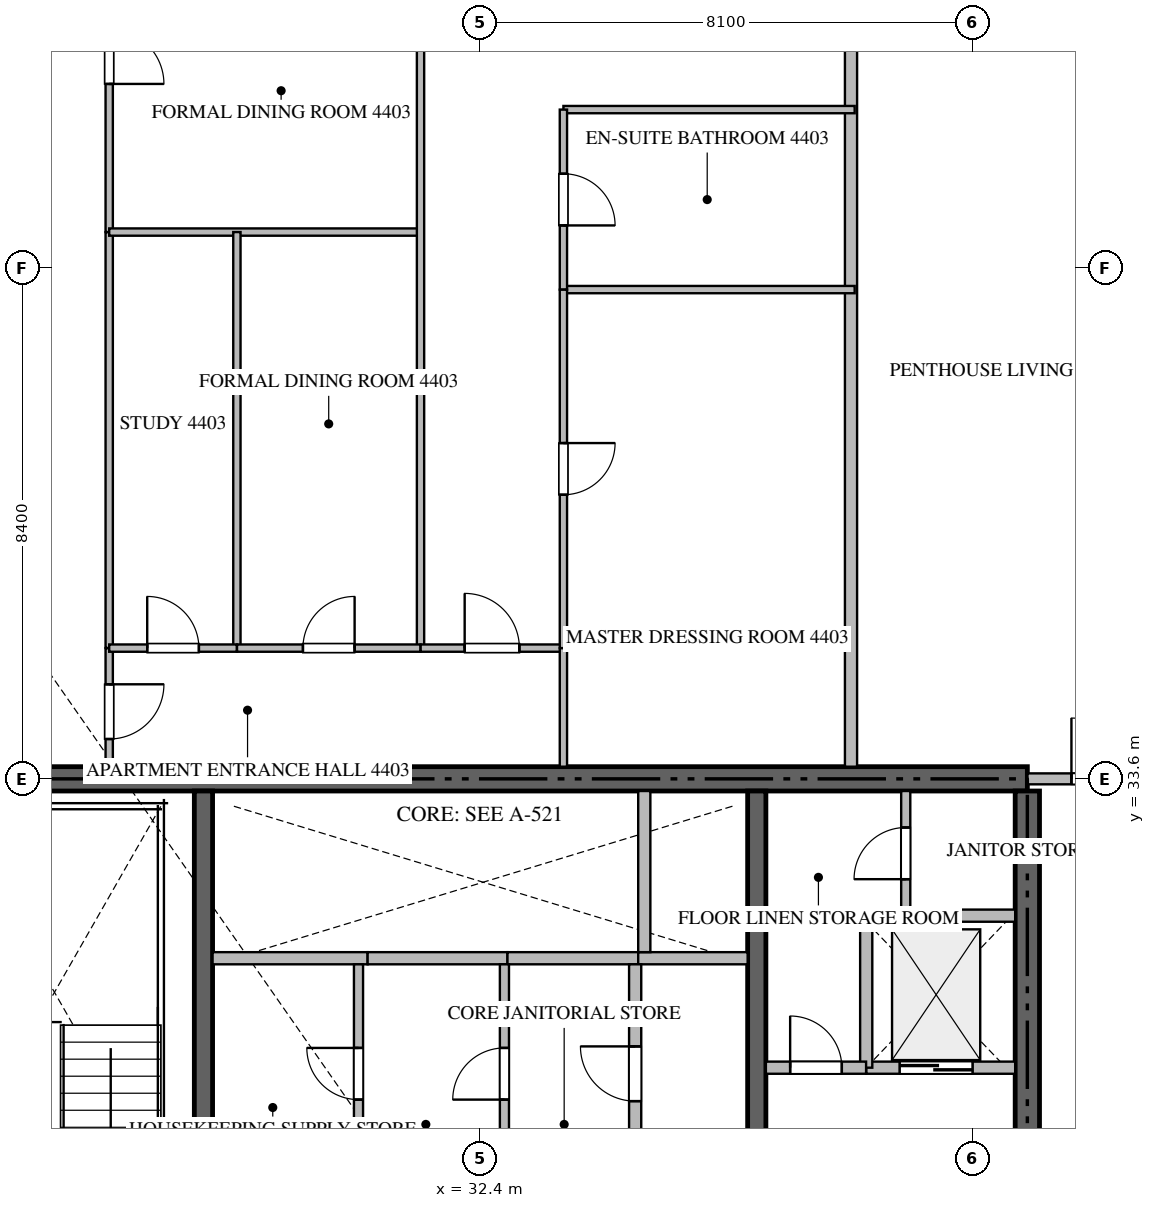
"""IFC4 building model, lengths in metres.
Left out: names, types, materials, properties, quantities, classifications, styles, units other than length and angle.
Written with IfcOpenShell. Run it as: python <this file> out.ifc"""

import sys

from ifc_helpers import new_model, si_unit, direction, frame, frame_2d, origin, place, context, subcontext, project, spatial, rectangle, extrude, source, transform, mapped, element, fill, save


model = new_model("IFC4")
c1 = context("Model", 3, precision=1e-05, world=origin(), true_north=direction((0.0, 1.0)))
c2 = subcontext(c1, "Body", "Model", "MODEL_VIEW")
j1 = project(units=[si_unit("LENGTHUNIT", "METRE"), si_unit("PLANEANGLEUNIT", "RADIAN")], contexts=[c1])
p1 = place(None, origin())
s1 = spatial("IfcSite", under=j1, at=p1, CompositionType="ELEMENT")
p2 = place(p1, origin())
s2 = spatial("IfcBuilding", under=s1, at=p2, CompositionType="ELEMENT")
p3 = place(p2, frame((0.0, 0.0, 176.4)))
s3 = spatial("IfcBuildingStorey", under=s2, at=p3, CompositionType="ELEMENT", Elevation=176.4)
p4 = place(p3, frame((41.4, 33.6, -0.26), z_axis=(0.0, 0.0, 1.0), x_axis=(-1.0, 0.0, 0.0)))
e1 = element("IfcWall", 1, at=p4, inside=s3, PredefinedType="SHEAR", context=c2, shape_type="SweptSolid", body=[
    extrude(rectangle(XDim=18.0, YDim=0.4, at=frame_2d((9.0, 0.0))), origin(), (0.0, 0.0, 1.0), 3.748),
])
p5 = place(p3, frame((41.4, 27.75, -0.26), z_axis=(0.0, 0.0, 1.0), x_axis=(0.0, 1.0, 0.0)))
e2 = element("IfcWall", 2, at=p5, inside=s3, PredefinedType="SHEAR", context=c2, shape_type="SweptSolid", body=[
    extrude(rectangle(XDim=5.65, YDim=0.4, at=frame_2d((2.825, 0.0))), origin(), (0.0, 0.0, 1.0), 3.748),
])
p6 = place(p3, frame((27.85, 23.55, -0.26), z_axis=(0.0, 0.0, 1.0), x_axis=(0.0, 1.0, 0.0)))
e3 = element("IfcWall", 3, at=p6, inside=s3, PredefinedType="SHEAR", context=c2, shape_type="SweptSolid", body=[
    extrude(rectangle(XDim=9.85, YDim=0.3, at=frame_2d((4.925, 0.0))), origin(), (0.0, 0.0, 1.0), 3.748),
])
p7 = place(p3, frame((36.95, 27.05, -0.26), z_axis=(0.0, 0.0, 1.0), x_axis=(0.0, 1.0, 0.0)))
e4 = element("IfcWall", 4, at=p7, inside=s3, PredefinedType="SHEAR", context=c2, shape_type="SweptSolid", body=[
    extrude(rectangle(XDim=6.35, YDim=0.3, at=frame_2d((3.175, 0.0))), origin(), (0.0, 0.0, 1.0), 3.748),
])
p8 = place(p3, frame((38.75, 28.85, 0.0), z_axis=(0.0, 0.0, 1.0), x_axis=(1.0, 0.0, 0.0)))
e5 = element("IfcWall", 5, at=p8, inside=s3, PredefinedType="STANDARD", context=c2, shape_type="SweptSolid", body=[
    extrude(rectangle(XDim=2.45, YDim=0.2, at=frame_2d((1.225, 0.0))), origin(), (0.0, 0.0, 1.0), 3.49),
])
p9 = place(p8, frame((0.55, 0.0, 0.0)))
e6 = element("IfcOpeningElement", 6, at=p9, cuts=e5, PredefinedType="OPENING", context=c2, shape_type="SweptSolid", body=[
    extrude(rectangle(XDim=1.2, YDim=2.2, at=frame_2d((0.6, 1.1))), frame((0.0, 0.11, 0.0), z_axis=(0.0, -1.0, 0.0), x_axis=(1.0, 0.0, 0.0)), (0.0, 0.0, 1.0), 0.22),
])
p10 = place(p3, frame((28.0, 30.65, 0.0), z_axis=(0.0, 0.0, 1.0), x_axis=(1.0, 0.0, 0.0)))
e7 = element("IfcWall", 7, at=p10, inside=s3, PredefinedType="STANDARD", context=c2, shape_type="SweptSolid", body=[
    extrude(rectangle(XDim=2.55, YDim=0.2, at=frame_2d((1.275, 0.0))), origin(), (0.0, 0.0, 1.0), 3.49),
])
p11 = place(p3, frame((30.55, 30.65, 0.0), z_axis=(0.0, 0.0, 1.0), x_axis=(1.0, 0.0, 0.0)))
e8 = element("IfcWall", 8, at=p11, inside=s3, PredefinedType="STANDARD", context=c2, shape_type="SweptSolid", body=[
    extrude(rectangle(XDim=2.3, YDim=0.2, at=frame_2d((1.15, 0.0))), origin(), (0.0, 0.0, 1.0), 3.49),
])
p12 = place(p3, frame((32.85, 30.65, 0.0), z_axis=(0.0, 0.0, 1.0), x_axis=(1.0, 0.0, 0.0)))
e9 = element("IfcWall", 9, at=p12, inside=s3, PredefinedType="STANDARD", context=c2, shape_type="SweptSolid", body=[
    extrude(rectangle(XDim=2.15, YDim=0.2, at=frame_2d((1.075, 0.0))), origin(), (0.0, 0.0, 1.0), 3.49),
])
p13 = place(p3, frame((35.0, 30.65, 0.0), z_axis=(0.0, 0.0, 1.0), x_axis=(1.0, 0.0, 0.0)))
e10 = element("IfcWall", 10, at=p13, inside=s3, PredefinedType="STANDARD", context=c2, shape_type="SweptSolid", body=[
    extrude(rectangle(XDim=1.8, YDim=0.2, at=frame_2d((0.9, 0.0))), origin(), (0.0, 0.0, 1.0), 3.49),
])
p14 = place(p3, frame((35.1, 30.75, 0.0), z_axis=(0.0, 0.0, 1.0), x_axis=(0.0, 1.0, 0.0)))
e11 = element("IfcWall", 11, at=p14, inside=s3, PredefinedType="STANDARD", context=c2, shape_type="SweptSolid", body=[
    extrude(rectangle(XDim=2.65, YDim=0.2, at=frame_2d((1.325, 0.0))), origin(), (0.0, 0.0, 1.0), 3.49),
])
p15 = place(p3, frame((38.75, 28.85, 0.0), z_axis=(0.0, 0.0, 1.0), x_axis=(0.0, 1.0, 0.0)))
e12 = element("IfcWall", 12, at=p15, inside=s3, PredefinedType="STANDARD", context=c2, shape_type="SweptSolid", body=[
    extrude(rectangle(XDim=2.5, YDim=0.2, at=frame_2d((1.25, 0.0))), origin(), (0.0, 0.0, 1.0), 3.49),
])
p16 = place(p3, frame((38.75, 31.35, 0.0), z_axis=(0.0, 0.0, 1.0), x_axis=(1.0, 0.0, 0.0)))
e13 = element("IfcWall", 13, at=p16, inside=s3, PredefinedType="STANDARD", context=c2, shape_type="SweptSolid", body=[
    extrude(rectangle(XDim=2.45, YDim=0.2, at=frame_2d((1.225, 0.0))), origin(), (0.0, 0.0, 1.0), 3.49),
])
p17 = place(p3, frame((37.1, 28.85, 0.0), z_axis=(0.0, 0.0, 1.0), x_axis=(1.0, 0.0, 0.0)))
e14 = element("IfcWall", 14, at=p17, inside=s3, PredefinedType="STANDARD", context=c2, shape_type="SweptSolid", body=[
    extrude(rectangle(XDim=1.648, YDim=0.2, at=frame_2d((0.824, 0.0))), origin(), (0.0, 0.0, 1.0), 3.49),
])
p18 = place(p17, frame((0.399, 0.0, 0.0)))
e15 = element("IfcOpeningElement", 15, at=p18, cuts=e14, PredefinedType="OPENING", context=c2, shape_type="SweptSolid", body=[
    extrude(rectangle(XDim=0.85, YDim=2.1, at=frame_2d((0.425, 1.05))), frame((0.0, 0.11, 0.0), z_axis=(0.0, -1.0, 0.0), x_axis=(1.0, 0.0, 0.0)), (0.0, 0.0, 1.0), 0.22),
])
p19 = place(p3, frame((39.4, 31.35, 0.0), z_axis=(0.0, 0.0, 1.0), x_axis=(0.0, 1.0, 0.0)))
e16 = element("IfcWall", 16, at=p19, inside=s3, PredefinedType="PARTITIONING", context=c2, shape_type="SweptSolid", body=[
    extrude(rectangle(XDim=2.05, YDim=0.15, at=frame_2d((1.025, 0.0))), origin(), (0.0, 0.0, 1.0), 3.49),
])
p20 = place(p19, frame((0.6, 0.0, 0.0)))
e17 = element("IfcOpeningElement", 17, at=p20, cuts=e16, PredefinedType="OPENING", context=c2, shape_type="SweptSolid", body=[
    extrude(rectangle(XDim=0.85, YDim=2.1, at=frame_2d((0.425, 1.05))), frame((0.0, 0.085, 0.0), z_axis=(0.0, -1.0, 0.0), x_axis=(1.0, 0.0, 0.0)), (0.0, 0.0, 1.0), 0.17),
])
p21 = place(p3, frame((34.95, 26.95, 0.0), z_axis=(0.0, 0.0, 1.0), x_axis=(0.0, 1.0, 0.0)))
e18 = element("IfcWall", 18, at=p21, inside=s3, PredefinedType="STANDARD", context=c2, shape_type="SweptSolid", body=[
    extrude(rectangle(XDim=3.6, YDim=0.2, at=frame_2d((1.8, 0.0))), origin(), (0.0, 0.0, 1.0), 3.49),
])
p22 = place(p21, frame((1.35, 0.0, 0.0)))
e19 = element("IfcOpeningElement", 19, at=p22, cuts=e18, PredefinedType="OPENING", context=c2, shape_type="SweptSolid", body=[
    extrude(rectangle(XDim=0.9, YDim=2.1, at=frame_2d((0.45, 1.05))), frame((0.0, 0.11, 0.0), z_axis=(0.0, -1.0, 0.0), x_axis=(1.0, 0.0, 0.0)), (0.0, 0.0, 1.0), 0.22),
])
p23 = place(p3, frame((32.8, 26.95, 0.0), z_axis=(0.0, 0.0, 1.0), x_axis=(0.0, 1.0, 0.0)))
e20 = element("IfcWall", 20, at=p23, inside=s3, PredefinedType="PARTITIONING", context=c2, shape_type="SweptSolid", body=[
    extrude(rectangle(XDim=3.6, YDim=0.15, at=frame_2d((1.8, 0.0))), origin(), (0.0, 0.0, 1.0), 3.49),
])
p24 = place(p23, frame((1.375, 0.0, 0.0)))
e21 = element("IfcOpeningElement", 21, at=p24, cuts=e20, PredefinedType="OPENING", context=c2, shape_type="SweptSolid", body=[
    extrude(rectangle(XDim=0.85, YDim=2.1, at=frame_2d((0.425, 1.05))), frame((0.0, 0.085, 0.0), z_axis=(0.0, -1.0, 0.0), x_axis=(1.0, 0.0, 0.0)), (0.0, 0.0, 1.0), 0.17),
])
p25 = place(p3, frame((30.4, 26.95, 0.0), z_axis=(0.0, 0.0, 1.0), x_axis=(0.0, 1.0, 0.0)))
e22 = element("IfcWall", 22, at=p25, inside=s3, PredefinedType="PARTITIONING", context=c2, shape_type="SweptSolid", body=[
    extrude(rectangle(XDim=3.6, YDim=0.15, at=frame_2d((1.8, 0.0))), origin(), (0.0, 0.0, 1.0), 3.49),
])
p26 = place(p25, frame((1.375, 0.0, 0.0)))
e23 = element("IfcOpeningElement", 23, at=p26, cuts=e22, PredefinedType="OPENING", context=c2, shape_type="SweptSolid", body=[
    extrude(rectangle(XDim=0.85, YDim=2.1, at=frame_2d((0.425, 1.05))), frame((0.0, 0.085, 0.0), z_axis=(0.0, -1.0, 0.0), x_axis=(1.0, 0.0, 0.0)), (0.0, 0.0, 1.0), 0.17),
])
p27 = place(p3, frame((38.5, 33.8, 0.0), z_axis=(0.0, 0.0, 1.0), x_axis=(0.0, 1.0, 0.0)))
e24 = element("IfcWall", 24, at=p27, inside=s3, PredefinedType="PARTITIONING", context=c2, shape_type="SweptSolid", body=[
    extrude(rectangle(XDim=15.118, YDim=0.2, at=frame_2d((7.559, 0.0))), origin(), (0.0, 0.0, 1.0), 3.49),
])
p28 = place(p3, frame((41.402, 33.6, 0.0), z_axis=(0.0, 0.0, 1.0), x_axis=(1.0, 0.0, 0.0)))
e25 = element("IfcWall", 25, at=p28, inside=s3, PredefinedType="PARTITIONING", context=c2, shape_type="SweptSolid", body=[
    extrude(rectangle(XDim=2.446, YDim=0.18, at=frame_2d((1.223, 0.0))), origin(), (0.0, 0.0, 1.0), 3.49),
])
p29 = place(p28, frame((0.723, 0.0, 0.0)))
e26 = element("IfcOpeningElement", 26, at=p29, cuts=e25, PredefinedType="OPENING", context=c2, shape_type="SweptSolid", body=[
    extrude(rectangle(XDim=1.0, YDim=2.15, at=frame_2d((0.5, 1.075))), frame((0.0, 0.1, 0.0), z_axis=(0.0, -1.0, 0.0), x_axis=(1.0, 0.0, 0.0)), (0.0, 0.0, 1.0), 0.2),
])
p30 = place(p3, frame((26.3, 35.75, 0.0), z_axis=(0.0, 0.0, 1.0), x_axis=(0.0, -1.0, 0.0)))
e27 = element("IfcWall", 27, at=p30, inside=s3, PredefinedType="PARTITIONING", context=c2, shape_type="SweptSolid", body=[
    extrude(rectangle(XDim=1.95, YDim=0.12, at=frame_2d((0.975, 0.0))), origin(), (0.0, 0.0, 1.0), 3.49),
])
p31 = place(p30, frame((0.595, 0.0, 0.0)))
e28 = element("IfcOpeningElement", 28, at=p31, cuts=e27, PredefinedType="OPENING", context=c2, shape_type="SweptSolid", body=[
    extrude(rectangle(XDim=0.9, YDim=2.1, at=frame_2d((0.45, 1.05))), frame((0.0, 0.07, 0.0), z_axis=(0.0, -1.0, 0.0), x_axis=(1.0, 0.0, 0.0)), (0.0, 0.0, 1.0), 0.14),
])
p32 = place(p3, frame((26.3, 48.905, 0.0), z_axis=(0.0, 0.0, 1.0), x_axis=(0.0, -1.0, 0.0)))
e29 = element("IfcWall", 29, at=p32, inside=s3, PredefinedType="PARTITIONING", context=c2, shape_type="SweptSolid", body=[
    extrude(rectangle(XDim=6.313, YDim=0.12, at=frame_2d((3.156, 0.0))), origin(), (0.0, 0.0, 1.0), 3.49),
])
p33 = place(p32, frame((2.977, 0.0, 0.0)))
e30 = element("IfcOpeningElement", 30, at=p33, cuts=e29, PredefinedType="OPENING", context=c2, shape_type="SweptSolid", body=[
    extrude(rectangle(XDim=0.9, YDim=2.1, at=frame_2d((0.45, 1.05))), frame((0.0, 0.07, 0.0), z_axis=(0.0, -1.0, 0.0), x_axis=(1.0, 0.0, 0.0)), (0.0, 0.0, 1.0), 0.14),
])
p34 = place(p3, frame((26.3, 42.59, 0.0), z_axis=(0.0, 0.0, 1.0), x_axis=(0.0, -1.0, 0.0)))
e31 = element("IfcWall", 31, at=p34, inside=s3, PredefinedType="PARTITIONING", context=c2, shape_type="SweptSolid", body=[
    extrude(rectangle(XDim=6.838, YDim=0.12, at=frame_2d((3.419, 0.0))), origin(), (0.0, 0.0, 1.0), 3.49),
])
p35 = place(p3, frame((26.3, 42.592, 0.0), z_axis=(0.0, 0.0, 1.0), x_axis=(1.0, 0.0, 0.0)))
e32 = element("IfcWall", 32, at=p35, inside=s3, PredefinedType="PARTITIONING", context=c2, shape_type="SweptSolid", body=[
    extrude(rectangle(XDim=5.12, YDim=0.12, at=frame_2d((2.56, 0.0))), origin(), (0.0, 0.0, 1.0), 3.49),
])
p36 = place(p3, frame((31.42, 48.905, 0.0), z_axis=(0.0, 0.0, 1.0), x_axis=(0.0, -1.0, 0.0)))
e33 = element("IfcWall", 33, at=p36, inside=s3, PredefinedType="PARTITIONING", context=c2, shape_type="SweptSolid", body=[
    extrude(rectangle(XDim=13.155, YDim=0.12, at=frame_2d((6.578, 0.0))), origin(), (0.0, 0.0, 1.0), 3.49),
])
p37 = place(p3, frame((28.4, 42.592, 0.0), z_axis=(0.0, 0.0, 1.0), x_axis=(0.0, -1.0, 0.0)))
e34 = element("IfcWall", 34, at=p37, inside=s3, PredefinedType="PARTITIONING", context=c2, shape_type="SweptSolid", body=[
    extrude(rectangle(XDim=6.842, YDim=0.12, at=frame_2d((3.421, 0.0))), origin(), (0.0, 0.0, 1.0), 3.49),
])
p38 = place(p3, frame((26.3, 35.75, 0.0), z_axis=(0.0, 0.0, 1.0), x_axis=(1.0, 0.0, 0.0)))
e35 = element("IfcWall", 35, at=p38, inside=s3, PredefinedType="PARTITIONING", context=c2, shape_type="SweptSolid", body=[
    extrude(rectangle(XDim=2.1, YDim=0.12, at=frame_2d((1.05, 0.0))), origin(), (0.0, 0.0, 1.0), 3.49),
])
p39 = place(p38, frame((0.625, 0.0, 0.0)))
e36 = element("IfcOpeningElement", 36, at=p39, cuts=e35, PredefinedType="OPENING", context=c2, shape_type="SweptSolid", body=[
    extrude(rectangle(XDim=0.85, YDim=2.1, at=frame_2d((0.425, 1.05))), frame((0.0, 0.07, 0.0), z_axis=(0.0, -1.0, 0.0), x_axis=(1.0, 0.0, 0.0)), (0.0, 0.0, 1.0), 0.14),
])
p40 = place(p3, frame((28.402, 35.75, 0.0), z_axis=(0.0, 0.0, 1.0), x_axis=(1.0, 0.0, 0.0)))
e37 = element("IfcWall", 37, at=p40, inside=s3, PredefinedType="PARTITIONING", context=c2, shape_type="SweptSolid", body=[
    extrude(rectangle(XDim=3.018, YDim=0.12, at=frame_2d((1.509, 0.0))), origin(), (0.0, 0.0, 1.0), 3.49),
])
p41 = place(p40, frame((1.084, 0.0, 0.0)))
e38 = element("IfcOpeningElement", 38, at=p41, cuts=e37, PredefinedType="OPENING", context=c2, shape_type="SweptSolid", body=[
    extrude(rectangle(XDim=0.85, YDim=2.1, at=frame_2d((0.425, 1.05))), frame((0.0, 0.07, 0.0), z_axis=(0.0, -1.0, 0.0), x_axis=(1.0, 0.0, 0.0)), (0.0, 0.0, 1.0), 0.14),
])
p42 = place(p3, frame((31.422, 35.75, 0.0), z_axis=(0.0, 0.0, 1.0), x_axis=(1.0, 0.0, 0.0)))
e39 = element("IfcWall", 39, at=p42, inside=s3, PredefinedType="PARTITIONING", context=c2, shape_type="SweptSolid", body=[
    extrude(rectangle(XDim=2.348, YDim=0.12, at=frame_2d((1.174, 0.0))), origin(), (0.0, 0.0, 1.0), 3.49),
])
p43 = place(p42, frame((0.724, 0.0, 0.0)))
e40 = element("IfcOpeningElement", 40, at=p43, cuts=e39, PredefinedType="OPENING", context=c2, shape_type="SweptSolid", body=[
    extrude(rectangle(XDim=0.9, YDim=2.1, at=frame_2d((0.45, 1.05))), frame((0.0, 0.07, 0.0), z_axis=(0.0, -1.0, 0.0), x_axis=(1.0, 0.0, 0.0)), (0.0, 0.0, 1.0), 0.14),
])
for number, where, z_axis, x_axis in (
    (41, (33.77, 44.606, 0.0), (0.0, 0.0, 1.0), (1.0, 0.0, 0.0)),
    (42, (33.77, 41.646, 0.0), (0.0, 0.0, 1.0), (1.0, 0.0, 0.0)),
):
    element("IfcWall", number, at=place(p3, frame(where, z_axis=z_axis, x_axis=x_axis)), inside=s3, PredefinedType="PARTITIONING", context=c2, shape_type="SweptSolid", body=[
        extrude(rectangle(XDim=4.79, YDim=0.12, at=frame_2d((2.395, 0.0))), origin(), (0.0, 0.0, 1.0), 3.49),
    ])
p44 = place(p3, frame((33.77, 44.606, 0.0), z_axis=(0.0, 0.0, 1.0), x_axis=(0.0, -1.0, 0.0)))
e43 = element("IfcWall", 43, at=p44, inside=s3, PredefinedType="PARTITIONING", context=c2, shape_type="SweptSolid", body=[
    extrude(rectangle(XDim=2.96, YDim=0.12, at=frame_2d((1.48, 0.0))), origin(), (0.0, 0.0, 1.0), 3.49),
])
p45 = place(p44, frame((1.055, 0.0, 0.0)))
e44 = element("IfcOpeningElement", 44, at=p45, cuts=e43, PredefinedType="OPENING", context=c2, shape_type="SweptSolid", body=[
    extrude(rectangle(XDim=0.85, YDim=2.1, at=frame_2d((0.425, 1.05))), frame((0.0, 0.07, 0.0), z_axis=(0.0, -1.0, 0.0), x_axis=(1.0, 0.0, 0.0)), (0.0, 0.0, 1.0), 0.14),
])
p46 = place(p3, frame((33.77, 41.644, 0.0), z_axis=(0.0, 0.0, 1.0), x_axis=(0.0, -1.0, 0.0)))
e45 = element("IfcWall", 45, at=p46, inside=s3, PredefinedType="PARTITIONING", context=c2, shape_type="SweptSolid", body=[
    extrude(rectangle(XDim=5.894, YDim=0.12, at=frame_2d((2.947, 0.0))), origin(), (0.0, 0.0, 1.0), 3.49),
])
p47 = place(p46, frame((2.522, 0.0, 0.0)))
e46 = element("IfcOpeningElement", 46, at=p47, cuts=e45, PredefinedType="OPENING", context=c2, shape_type="SweptSolid", body=[
    extrude(rectangle(XDim=0.85, YDim=2.1, at=frame_2d((0.425, 1.05))), frame((0.0, 0.07, 0.0), z_axis=(0.0, -1.0, 0.0), x_axis=(1.0, 0.0, 0.0)), (0.0, 0.0, 1.0), 0.14),
])
p48 = place(p3, frame((33.77, 35.748, 0.0), z_axis=(0.0, 0.0, 1.0), x_axis=(0.0, -1.0, 0.0)))
e47 = element("IfcWall", 47, at=p48, inside=s3, PredefinedType="PARTITIONING", context=c2, shape_type="SweptSolid", body=[
    extrude(rectangle(XDim=1.948, YDim=0.12, at=frame_2d((0.974, 0.0))), origin(), (0.0, 0.0, 1.0), 3.49),
])
m1 = source(origin(), c2, "Body", "SweptSolid", [
    extrude(rectangle(XDim=1.2, YDim=2.2, at=frame_2d((0.6, 1.1))), frame((0.0, 0.025, 0.0), z_axis=(0.0, -1.0, 0.0), x_axis=(1.0, 0.0, 0.0)), (0.0, 0.0, 1.0), 0.05),
])
p49 = place(p9, origin())
e48 = element("IfcDoor", 48, at=p49, inside=s3, OperationType="DOUBLE_DOOR_SLIDING", PredefinedType="DOOR", context=c2, shape_type="MappedRepresentation", body=[
    mapped(m1, transform((0.0, 0.0, 0.0), scale=1.0)),
])
fill(e6, e48)
m2 = source(origin(), c2, "Body", "SweptSolid", [
    extrude(rectangle(XDim=0.85, YDim=2.1, at=frame_2d((0.425, 1.05))), frame((0.0, 0.025, 0.0), z_axis=(0.0, -1.0, 0.0), x_axis=(1.0, 0.0, 0.0)), (0.0, 0.0, 1.0), 0.05),
])
p50 = place(p18, origin())
e49 = element("IfcDoor", 49, at=p50, inside=s3, OperationType="SINGLE_SWING_LEFT", PredefinedType="DOOR", context=c2, shape_type="MappedRepresentation", body=[
    mapped(m2, transform((0.0, 0.0, 0.0), scale=1.0)),
])
fill(e15, e49)
p51 = place(p20, origin())
e50 = element("IfcDoor", 50, at=p51, inside=s3, OperationType="SINGLE_SWING_LEFT", PredefinedType="DOOR", context=c2, shape_type="MappedRepresentation", body=[
    mapped(m2, transform((0.0, 0.0, 0.0), scale=1.0)),
])
fill(e17, e50)
m3 = source(origin(), c2, "Body", "SweptSolid", [
    extrude(rectangle(XDim=0.9, YDim=2.1, at=frame_2d((0.45, 1.05))), frame((0.0, 0.025, 0.0), z_axis=(0.0, -1.0, 0.0), x_axis=(1.0, 0.0, 0.0)), (0.0, 0.0, 1.0), 0.05),
])
p52 = place(p22, origin())
e51 = element("IfcDoor", 51, at=p52, inside=s3, OperationType="SINGLE_SWING_RIGHT", PredefinedType="DOOR", context=c2, shape_type="MappedRepresentation", body=[
    mapped(m3, transform((0.0, 0.0, 0.0), scale=1.0)),
])
fill(e19, e51)
p53 = place(p24, origin())
e52 = element("IfcDoor", 52, at=p53, inside=s3, OperationType="SINGLE_SWING_LEFT", PredefinedType="DOOR", context=c2, shape_type="MappedRepresentation", body=[
    mapped(m2, transform((0.0, 0.0, 0.0), scale=1.0)),
])
fill(e21, e52)
p54 = place(p26, origin())
e53 = element("IfcDoor", 53, at=p54, inside=s3, OperationType="SINGLE_SWING_RIGHT", PredefinedType="DOOR", context=c2, shape_type="MappedRepresentation", body=[
    mapped(m2, transform((0.0, 0.0, 0.0), scale=1.0)),
])
fill(e23, e53)
m4 = source(origin(), c2, "Body", "SweptSolid", [
    extrude(rectangle(XDim=1.0, YDim=2.15, at=frame_2d((0.5, 1.075))), frame((0.0, 0.025, 0.0), z_axis=(0.0, -1.0, 0.0), x_axis=(1.0, 0.0, 0.0)), (0.0, 0.0, 1.0), 0.05),
])
p55 = place(p29, origin())
e54 = element("IfcDoor", 54, at=p55, inside=s3, OperationType="SINGLE_SWING_LEFT", PredefinedType="DOOR", context=c2, shape_type="MappedRepresentation", body=[
    mapped(m4, transform((0.0, 0.0, 0.0), scale=1.0)),
])
fill(e26, e54)
p56 = place(p31, origin())
e55 = element("IfcDoor", 55, at=p56, inside=s3, OperationType="SINGLE_SWING_LEFT", PredefinedType="DOOR", context=c2, shape_type="MappedRepresentation", body=[
    mapped(m3, transform((0.0, 0.0, 0.0), scale=1.0)),
])
fill(e28, e55)
p57 = place(p33, origin())
e56 = element("IfcDoor", 56, at=p57, inside=s3, OperationType="SINGLE_SWING_RIGHT", PredefinedType="DOOR", context=c2, shape_type="MappedRepresentation", body=[
    mapped(m3, transform((0.0, 0.0, 0.0), scale=1.0)),
])
fill(e30, e56)
p58 = place(p39, origin())
e57 = element("IfcDoor", 57, at=p58, inside=s3, OperationType="SINGLE_SWING_LEFT", PredefinedType="DOOR", context=c2, shape_type="MappedRepresentation", body=[
    mapped(m2, transform((0.0, 0.0, 0.0), scale=1.0)),
])
fill(e36, e57)
p59 = place(p41, origin())
e58 = element("IfcDoor", 58, at=p59, inside=s3, OperationType="SINGLE_SWING_RIGHT", PredefinedType="DOOR", context=c2, shape_type="MappedRepresentation", body=[
    mapped(m2, transform((0.0, 0.0, 0.0), scale=1.0)),
])
fill(e38, e58)
p60 = place(p43, origin())
e59 = element("IfcDoor", 59, at=p60, inside=s3, OperationType="SINGLE_SWING_LEFT", PredefinedType="DOOR", context=c2, shape_type="MappedRepresentation", body=[
    mapped(m3, transform((0.0, 0.0, 0.0), scale=1.0)),
])
fill(e40, e59)
p61 = place(p45, origin())
e60 = element("IfcDoor", 60, at=p61, inside=s3, OperationType="SINGLE_SWING_RIGHT", PredefinedType="DOOR", context=c2, shape_type="MappedRepresentation", body=[
    mapped(m2, transform((0.0, 0.0, 0.0), scale=1.0)),
])
fill(e44, e60)
p62 = place(p47, origin())
e61 = element("IfcDoor", 61, at=p62, inside=s3, OperationType="SINGLE_SWING_LEFT", PredefinedType="DOOR", context=c2, shape_type="MappedRepresentation", body=[
    mapped(m2, transform((0.0, 0.0, 0.0), scale=1.0)),
])
fill(e46, e61)
save(model, sys.argv[1])
